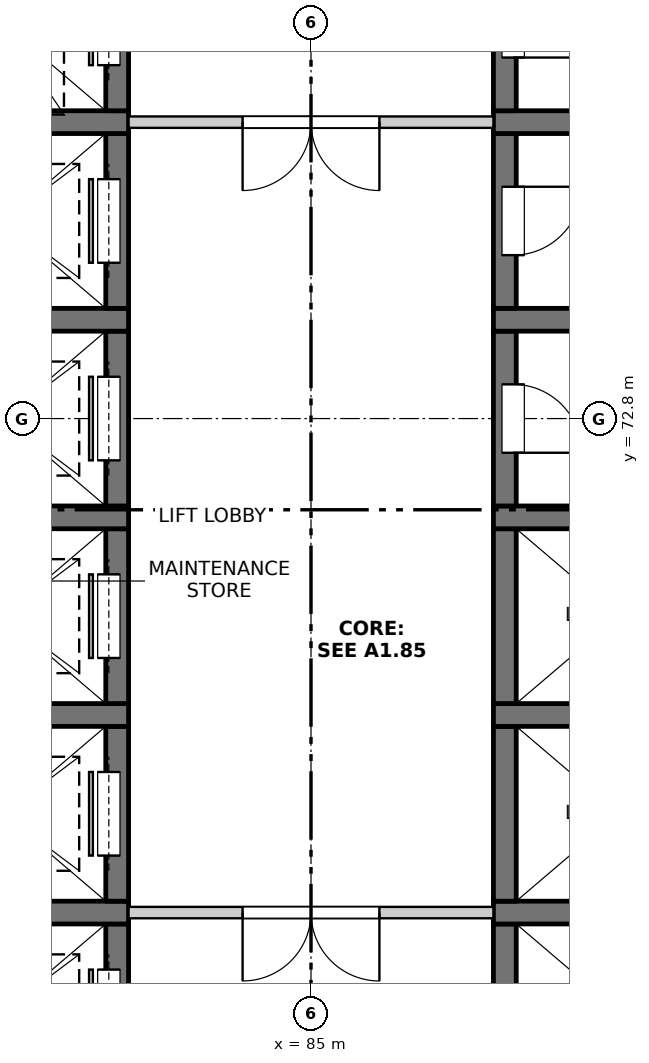
"""IFC4 building model, lengths in metres.
Left out: names, types, materials, properties, quantities, classifications, styles, units other than length and angle.
Written with IfcOpenShell. Run it as: python <this file> out.ifc"""

import sys

from ifc_helpers import new_model, si_unit, direction, frame, frame_2d, origin, place, context, subcontext, project, spatial, rectangle, extrude, element, fill, save


model = new_model("IFC4")
c1 = context("Model", 3, precision=1e-05, world=origin(), true_north=direction((0.0, 1.0)))
c2 = subcontext(c1, "Body", "Model", "MODEL_VIEW")
j1 = project(units=[si_unit("LENGTHUNIT", "METRE"), si_unit("PLANEANGLEUNIT", "RADIAN")], contexts=[c1])
p1 = place(None, origin())
s1 = spatial("IfcSite", under=j1, at=p1, CompositionType="ELEMENT")
p2 = place(p1, origin())
s2 = spatial("IfcBuilding", under=s1, at=p2, CompositionType="ELEMENT")
p3 = place(p2, frame((0.0, 0.0, 110.1)))
s3 = spatial("IfcBuildingStorey", under=s2, at=p3, CompositionType="ELEMENT", Elevation=110.1)
p4 = place(p3, frame((82.45, 63.85, -0.25), z_axis=(0.0, 0.0, 1.0), x_axis=(0.0, 1.0, 0.0)))
e1 = element("IfcWall", 1, at=p4, inside=s3, PredefinedType="SOLIDWALL", context=c2, shape_type="SweptSolid", body=[
    extrude(rectangle(XDim=2.3, YDim=0.3, at=frame_2d((1.15, 0.0))), origin(), (0.0, 0.0, 1.0), 3.4),
])
p5 = place(p4, frame((0.6, 0.0, 0.25)))
e2 = element("IfcOpeningElement", 2, at=p5, cuts=e1, PredefinedType="OPENING", context=c2, shape_type="SweptSolid", body=[
    extrude(rectangle(XDim=1.1, YDim=2.1, at=frame_2d((0.55, 1.05))), frame((0.0, 0.16, 0.0), z_axis=(0.0, -1.0, 0.0), x_axis=(1.0, 0.0, 0.0)), (0.0, 0.0, 1.0), 0.32),
])
p6 = place(p3, frame((79.6, 66.3, -0.25), z_axis=(0.0, 0.0, 1.0), x_axis=(1.0, 0.0, 0.0)))
e3 = element("IfcWall", 3, at=p6, inside=s3, PredefinedType="SOLIDWALL", context=c2, shape_type="SweptSolid", body=[
    extrude(rectangle(XDim=3.0, YDim=0.3, at=frame_2d((1.5, 0.0))), origin(), (0.0, 0.0, 1.0), 3.4),
])
p7 = place(p3, frame((82.45, 66.45, -0.25), z_axis=(0.0, 0.0, 1.0), x_axis=(0.0, 1.0, 0.0)))
e4 = element("IfcWall", 4, at=p7, inside=s3, PredefinedType="SOLIDWALL", context=c2, shape_type="SweptSolid", body=[
    extrude(rectangle(XDim=2.3, YDim=0.3, at=frame_2d((1.15, 0.0))), origin(), (0.0, 0.0, 1.0), 3.4),
])
p8 = place(p7, frame((0.6, 0.0, 0.25)))
e5 = element("IfcOpeningElement", 5, at=p8, cuts=e4, PredefinedType="OPENING", context=c2, shape_type="SweptSolid", body=[
    extrude(rectangle(XDim=1.1, YDim=2.1, at=frame_2d((0.55, 1.05))), frame((0.0, 0.16, 0.0), z_axis=(0.0, -1.0, 0.0), x_axis=(1.0, 0.0, 0.0)), (0.0, 0.0, 1.0), 0.32),
])
p9 = place(p3, frame((79.6, 68.9, -0.25), z_axis=(0.0, 0.0, 1.0), x_axis=(1.0, 0.0, 0.0)))
e6 = element("IfcWall", 6, at=p9, inside=s3, PredefinedType="SOLIDWALL", context=c2, shape_type="SweptSolid", body=[
    extrude(rectangle(XDim=3.0, YDim=0.3, at=frame_2d((1.5, 0.0))), origin(), (0.0, 0.0, 1.0), 3.4),
])
p10 = place(p3, frame((82.45, 69.05, -0.25), z_axis=(0.0, 0.0, 1.0), x_axis=(0.0, 1.0, 0.0)))
e7 = element("IfcWall", 7, at=p10, inside=s3, PredefinedType="SOLIDWALL", context=c2, shape_type="SweptSolid", body=[
    extrude(rectangle(XDim=2.3, YDim=0.3, at=frame_2d((1.15, 0.0))), origin(), (0.0, 0.0, 1.0), 3.4),
])
p11 = place(p10, frame((0.6, 0.0, 0.25)))
e8 = element("IfcOpeningElement", 8, at=p11, cuts=e7, PredefinedType="OPENING", context=c2, shape_type="SweptSolid", body=[
    extrude(rectangle(XDim=1.1, YDim=2.1, at=frame_2d((0.55, 1.05))), frame((0.0, 0.16, 0.0), z_axis=(0.0, -1.0, 0.0), x_axis=(1.0, 0.0, 0.0)), (0.0, 0.0, 1.0), 0.32),
])
p12 = place(p3, frame((79.6, 71.5, -0.25), z_axis=(0.0, 0.0, 1.0), x_axis=(1.0, 0.0, 0.0)))
e9 = element("IfcWall", 9, at=p12, inside=s3, PredefinedType="SOLIDWALL", context=c2, shape_type="SweptSolid", body=[
    extrude(rectangle(XDim=3.0, YDim=0.3, at=frame_2d((1.5, 0.0))), origin(), (0.0, 0.0, 1.0), 3.4),
])
p13 = place(p3, frame((82.45, 71.65, -0.25), z_axis=(0.0, 0.0, 1.0), x_axis=(0.0, 1.0, 0.0)))
e10 = element("IfcWall", 10, at=p13, inside=s3, PredefinedType="SOLIDWALL", context=c2, shape_type="SweptSolid", body=[
    extrude(rectangle(XDim=2.3, YDim=0.3, at=frame_2d((1.15, 0.0))), origin(), (0.0, 0.0, 1.0), 3.4),
])
p14 = place(p13, frame((0.6, 0.0, 0.25)))
e11 = element("IfcOpeningElement", 11, at=p14, cuts=e10, PredefinedType="OPENING", context=c2, shape_type="SweptSolid", body=[
    extrude(rectangle(XDim=1.1, YDim=2.1, at=frame_2d((0.55, 1.05))), frame((0.0, 0.16, 0.0), z_axis=(0.0, -1.0, 0.0), x_axis=(1.0, 0.0, 0.0)), (0.0, 0.0, 1.0), 0.32),
])
p15 = place(p3, frame((79.6, 74.1, -0.25), z_axis=(0.0, 0.0, 1.0), x_axis=(1.0, 0.0, 0.0)))
e12 = element("IfcWall", 12, at=p15, inside=s3, PredefinedType="SOLIDWALL", context=c2, shape_type="SweptSolid", body=[
    extrude(rectangle(XDim=3.0, YDim=0.3, at=frame_2d((1.5, 0.0))), origin(), (0.0, 0.0, 1.0), 3.4),
])
p16 = place(p3, frame((82.45, 74.25, -0.25), z_axis=(0.0, 0.0, 1.0), x_axis=(0.0, 1.0, 0.0)))
e13 = element("IfcWall", 13, at=p16, inside=s3, PredefinedType="SOLIDWALL", context=c2, shape_type="SweptSolid", body=[
    extrude(rectangle(XDim=2.3, YDim=0.3, at=frame_2d((1.15, 0.0))), origin(), (0.0, 0.0, 1.0), 3.4),
])
p17 = place(p16, frame((0.6, 0.0, 0.25)))
e14 = element("IfcOpeningElement", 14, at=p17, cuts=e13, PredefinedType="OPENING", context=c2, shape_type="SweptSolid", body=[
    extrude(rectangle(XDim=1.1, YDim=2.1, at=frame_2d((0.55, 1.05))), frame((0.0, 0.16, 0.0), z_axis=(0.0, -1.0, 0.0), x_axis=(1.0, 0.0, 0.0)), (0.0, 0.0, 1.0), 0.32),
])
p18 = place(p3, frame((79.6, 76.7, -0.25), z_axis=(0.0, 0.0, 1.0), x_axis=(1.0, 0.0, 0.0)))
e15 = element("IfcWall", 15, at=p18, inside=s3, PredefinedType="SOLIDWALL", context=c2, shape_type="SweptSolid", body=[
    extrude(rectangle(XDim=3.0, YDim=0.3, at=frame_2d((1.5, 0.0))), origin(), (0.0, 0.0, 1.0), 3.4),
])
p19 = place(p3, frame((82.45, 76.85, -0.25), z_axis=(0.0, 0.0, 1.0), x_axis=(0.0, 1.0, 0.0)))
e16 = element("IfcWall", 16, at=p19, inside=s3, PredefinedType="SOLIDWALL", context=c2, shape_type="SweptSolid", body=[
    extrude(rectangle(XDim=2.3, YDim=0.3, at=frame_2d((1.15, 0.0))), origin(), (0.0, 0.0, 1.0), 3.4),
])
p20 = place(p19, frame((0.6, 0.0, 0.25)))
e17 = element("IfcOpeningElement", 17, at=p20, cuts=e16, PredefinedType="OPENING", context=c2, shape_type="SweptSolid", body=[
    extrude(rectangle(XDim=1.1, YDim=2.1, at=frame_2d((0.55, 1.05))), frame((0.0, 0.16, 0.0), z_axis=(0.0, -1.0, 0.0), x_axis=(1.0, 0.0, 0.0)), (0.0, 0.0, 1.0), 0.32),
])
p21 = place(p3, frame((87.55, 63.85, -0.25), z_axis=(0.0, 0.0, 1.0), x_axis=(0.0, 1.0, 0.0)))
e18 = element("IfcWall", 18, at=p21, inside=s3, PredefinedType="SOLIDWALL", context=c2, shape_type="SweptSolid", body=[
    extrude(rectangle(XDim=2.3, YDim=0.3, at=frame_2d((1.15, 0.0))), origin(), (0.0, 0.0, 1.0), 3.4),
])
p22 = place(p3, frame((87.4, 66.3, -0.25), z_axis=(0.0, 0.0, 1.0), x_axis=(1.0, 0.0, 0.0)))
e19 = element("IfcWall", 19, at=p22, inside=s3, PredefinedType="SOLIDWALL", context=c2, shape_type="SweptSolid", body=[
    extrude(rectangle(XDim=3.0, YDim=0.3, at=frame_2d((1.5, 0.0))), origin(), (0.0, 0.0, 1.0), 3.4),
])
p23 = place(p3, frame((87.55, 66.45, -0.25), z_axis=(0.0, 0.0, 1.0), x_axis=(0.0, 1.0, 0.0)))
e20 = element("IfcWall", 20, at=p23, inside=s3, PredefinedType="SOLIDWALL", context=c2, shape_type="SweptSolid", body=[
    extrude(rectangle(XDim=2.3, YDim=0.3, at=frame_2d((1.15, 0.0))), origin(), (0.0, 0.0, 1.0), 3.4),
])
p24 = place(p3, frame((87.4, 68.9, -0.25), z_axis=(0.0, 0.0, 1.0), x_axis=(1.0, 0.0, 0.0)))
e21 = element("IfcWall", 21, at=p24, inside=s3, PredefinedType="SOLIDWALL", context=c2, shape_type="SweptSolid", body=[
    extrude(rectangle(XDim=3.0, YDim=0.3, at=frame_2d((1.5, 0.0))), origin(), (0.0, 0.0, 1.0), 3.4),
])
p25 = place(p3, frame((87.55, 69.05, -0.25), z_axis=(0.0, 0.0, 1.0), x_axis=(0.0, 1.0, 0.0)))
e22 = element("IfcWall", 22, at=p25, inside=s3, PredefinedType="SOLIDWALL", context=c2, shape_type="SweptSolid", body=[
    extrude(rectangle(XDim=2.3, YDim=0.3, at=frame_2d((1.15, 0.0))), origin(), (0.0, 0.0, 1.0), 3.4),
])
p26 = place(p3, frame((87.4, 71.5, -0.25), z_axis=(0.0, 0.0, 1.0), x_axis=(1.0, 0.0, 0.0)))
e23 = element("IfcWall", 23, at=p26, inside=s3, PredefinedType="SOLIDWALL", context=c2, shape_type="SweptSolid", body=[
    extrude(rectangle(XDim=3.0, YDim=0.3, at=frame_2d((1.5, 0.0))), origin(), (0.0, 0.0, 1.0), 3.4),
])
p27 = place(p3, frame((87.55, 71.65, -0.25), z_axis=(0.0, 0.0, 1.0), x_axis=(0.0, 1.0, 0.0)))
e24 = element("IfcWall", 24, at=p27, inside=s3, PredefinedType="SOLIDWALL", context=c2, shape_type="SweptSolid", body=[
    extrude(rectangle(XDim=2.3, YDim=0.3, at=frame_2d((1.15, 0.0))), origin(), (0.0, 0.0, 1.0), 3.4),
])
p28 = place(p27, frame((0.7, 0.0, 0.25)))
e25 = element("IfcOpeningElement", 25, at=p28, cuts=e24, PredefinedType="OPENING", context=c2, shape_type="SweptSolid", body=[
    extrude(rectangle(XDim=0.9, YDim=2.1, at=frame_2d((0.45, 1.05))), frame((0.0, 0.16, 0.0), z_axis=(0.0, -1.0, 0.0), x_axis=(1.0, 0.0, 0.0)), (0.0, 0.0, 1.0), 0.32),
])
p29 = place(p3, frame((87.4, 74.1, -0.25), z_axis=(0.0, 0.0, 1.0), x_axis=(1.0, 0.0, 0.0)))
e26 = element("IfcWall", 26, at=p29, inside=s3, PredefinedType="SOLIDWALL", context=c2, shape_type="SweptSolid", body=[
    extrude(rectangle(XDim=3.0, YDim=0.3, at=frame_2d((1.5, 0.0))), origin(), (0.0, 0.0, 1.0), 3.4),
])
p30 = place(p3, frame((87.55, 74.25, -0.25), z_axis=(0.0, 0.0, 1.0), x_axis=(0.0, 1.0, 0.0)))
e27 = element("IfcWall", 27, at=p30, inside=s3, PredefinedType="SOLIDWALL", context=c2, shape_type="SweptSolid", body=[
    extrude(rectangle(XDim=2.3, YDim=0.3, at=frame_2d((1.15, 0.0))), origin(), (0.0, 0.0, 1.0), 3.4),
])
p31 = place(p30, frame((0.7, 0.0, 0.25)))
e28 = element("IfcOpeningElement", 28, at=p31, cuts=e27, PredefinedType="OPENING", context=c2, shape_type="SweptSolid", body=[
    extrude(rectangle(XDim=0.9, YDim=2.1, at=frame_2d((0.45, 1.05))), frame((0.0, 0.16, 0.0), z_axis=(0.0, -1.0, 0.0), x_axis=(1.0, 0.0, 0.0)), (0.0, 0.0, 1.0), 0.32),
])
p32 = place(p3, frame((87.4, 76.7, -0.25), z_axis=(0.0, 0.0, 1.0), x_axis=(1.0, 0.0, 0.0)))
e29 = element("IfcWall", 29, at=p32, inside=s3, PredefinedType="SOLIDWALL", context=c2, shape_type="SweptSolid", body=[
    extrude(rectangle(XDim=3.0, YDim=0.3, at=frame_2d((1.5, 0.0))), origin(), (0.0, 0.0, 1.0), 3.4),
])
p33 = place(p3, frame((87.55, 76.85, -0.25), z_axis=(0.0, 0.0, 1.0), x_axis=(0.0, 1.0, 0.0)))
e30 = element("IfcWall", 30, at=p33, inside=s3, PredefinedType="SOLIDWALL", context=c2, shape_type="SweptSolid", body=[
    extrude(rectangle(XDim=2.3, YDim=0.3, at=frame_2d((1.15, 0.0))), origin(), (0.0, 0.0, 1.0), 3.4),
])
p34 = place(p33, frame((0.7, 0.0, 0.25)))
e31 = element("IfcOpeningElement", 31, at=p34, cuts=e30, PredefinedType="OPENING", context=c2, shape_type="SweptSolid", body=[
    extrude(rectangle(XDim=0.9, YDim=2.1, at=frame_2d((0.45, 1.05))), frame((0.0, 0.16, 0.0), z_axis=(0.0, -1.0, 0.0), x_axis=(1.0, 0.0, 0.0)), (0.0, 0.0, 1.0), 0.32),
])
p35 = place(p3, frame((82.6, 66.3, 0.0), z_axis=(0.0, 0.0, 1.0), x_axis=(1.0, 0.0, 0.0)))
e32 = element("IfcWall", 32, at=p35, inside=s3, PredefinedType="PARTITIONING", context=c2, shape_type="SweptSolid", body=[
    extrude(rectangle(XDim=4.8, YDim=0.15, at=frame_2d((2.4, 0.0))), origin(), (0.0, 0.0, 1.0), 3.15),
])
p36 = place(p35, frame((1.5, 0.0, 0.0)))
e33 = element("IfcOpeningElement", 33, at=p36, cuts=e32, PredefinedType="OPENING", context=c2, shape_type="SweptSolid", body=[
    extrude(rectangle(XDim=1.8, YDim=2.1, at=frame_2d((0.9, 1.05))), frame((0.0, 0.085, 0.0), z_axis=(0.0, -1.0, 0.0), x_axis=(1.0, 0.0, 0.0)), (0.0, 0.0, 1.0), 0.17),
])
p37 = place(p3, frame((82.6, 76.7, 0.0), z_axis=(0.0, 0.0, 1.0), x_axis=(1.0, 0.0, 0.0)))
e34 = element("IfcWall", 34, at=p37, inside=s3, PredefinedType="PARTITIONING", context=c2, shape_type="SweptSolid", body=[
    extrude(rectangle(XDim=4.8, YDim=0.15, at=frame_2d((2.4, 0.0))), origin(), (0.0, 0.0, 1.0), 3.15),
])
p38 = place(p37, frame((1.5, 0.0, 0.0)))
e35 = element("IfcOpeningElement", 35, at=p38, cuts=e34, PredefinedType="OPENING", context=c2, shape_type="SweptSolid", body=[
    extrude(rectangle(XDim=1.8, YDim=2.1, at=frame_2d((0.9, 1.05))), frame((0.0, 0.085, 0.0), z_axis=(0.0, -1.0, 0.0), x_axis=(1.0, 0.0, 0.0)), (0.0, 0.0, 1.0), 0.17),
])
p39 = place(p5, origin())
e36 = element("IfcDoor", 36, at=p39, inside=s3, OperationType="SLIDING_TO_RIGHT", PredefinedType="DOOR", context=c2, shape_type="SweptSolid", body=[
    extrude(rectangle(XDim=1.1, YDim=2.1, at=frame_2d((0.55, 1.05))), frame((0.0, 0.135, 0.0), z_axis=(0.0, -1.0, 0.0), x_axis=(1.0, 0.0, 0.0)), (0.0, 0.0, 1.0), 0.05),
])
fill(e2, e36)
p40 = place(p36, origin())
e37 = element("IfcDoor", 37, at=p40, inside=s3, OperationType="DOUBLE_DOOR_SINGLE_SWING", PredefinedType="DOOR", context=c2, shape_type="SweptSolid", body=[
    extrude(rectangle(XDim=1.8, YDim=2.1, at=frame_2d((0.9, 1.05))), frame((0.0, 0.025, 0.0), z_axis=(0.0, -1.0, 0.0), x_axis=(1.0, 0.0, 0.0)), (0.0, 0.0, 1.0), 0.05),
])
fill(e33, e37)
p41 = place(p8, origin())
e38 = element("IfcDoor", 38, at=p41, inside=s3, OperationType="SLIDING_TO_RIGHT", PredefinedType="DOOR", context=c2, shape_type="SweptSolid", body=[
    extrude(rectangle(XDim=1.1, YDim=2.1, at=frame_2d((0.55, 1.05))), frame((0.0, 0.135, 0.0), z_axis=(0.0, -1.0, 0.0), x_axis=(1.0, 0.0, 0.0)), (0.0, 0.0, 1.0), 0.05),
])
fill(e5, e38)
p42 = place(p11, origin())
e39 = element("IfcDoor", 39, at=p42, inside=s3, OperationType="SLIDING_TO_LEFT", PredefinedType="DOOR", context=c2, shape_type="SweptSolid", body=[
    extrude(rectangle(XDim=1.1, YDim=2.1, at=frame_2d((0.55, 1.05))), frame((0.0, 0.135, 0.0), z_axis=(0.0, -1.0, 0.0), x_axis=(1.0, 0.0, 0.0)), (0.0, 0.0, 1.0), 0.05),
])
fill(e8, e39)
p43 = place(p14, origin())
e40 = element("IfcDoor", 40, at=p43, inside=s3, OperationType="SLIDING_TO_LEFT", PredefinedType="DOOR", context=c2, shape_type="SweptSolid", body=[
    extrude(rectangle(XDim=1.1, YDim=2.1, at=frame_2d((0.55, 1.05))), frame((0.0, 0.135, 0.0), z_axis=(0.0, -1.0, 0.0), x_axis=(1.0, 0.0, 0.0)), (0.0, 0.0, 1.0), 0.05),
])
fill(e11, e40)
p44 = place(p28, origin())
e41 = element("IfcDoor", 41, at=p44, inside=s3, OperationType="SINGLE_SWING_RIGHT", PredefinedType="DOOR", context=c2, shape_type="SweptSolid", body=[
    extrude(rectangle(XDim=0.9, YDim=2.1, at=frame_2d((0.45, 1.05))), frame((0.0, -0.085, 0.0), z_axis=(0.0, -1.0, 0.0), x_axis=(1.0, 0.0, 0.0)), (0.0, 0.0, 1.0), 0.05),
])
fill(e25, e41)
p45 = place(p17, origin())
e42 = element("IfcDoor", 42, at=p45, inside=s3, OperationType="SLIDING_TO_LEFT", PredefinedType="DOOR", context=c2, shape_type="SweptSolid", body=[
    extrude(rectangle(XDim=1.1, YDim=2.1, at=frame_2d((0.55, 1.05))), frame((0.0, 0.135, 0.0), z_axis=(0.0, -1.0, 0.0), x_axis=(1.0, 0.0, 0.0)), (0.0, 0.0, 1.0), 0.05),
])
fill(e14, e42)
p46 = place(p31, origin())
e43 = element("IfcDoor", 43, at=p46, inside=s3, OperationType="SINGLE_SWING_LEFT", PredefinedType="DOOR", context=c2, shape_type="SweptSolid", body=[
    extrude(rectangle(XDim=0.9, YDim=2.1, at=frame_2d((0.45, 1.05))), frame((0.0, -0.085, 0.0), z_axis=(0.0, -1.0, 0.0), x_axis=(1.0, 0.0, 0.0)), (0.0, 0.0, 1.0), 0.05),
])
fill(e28, e43)
p47 = place(p38, origin())
e44 = element("IfcDoor", 44, at=p47, inside=s3, OperationType="DOUBLE_DOOR_SINGLE_SWING", PredefinedType="DOOR", context=c2, shape_type="SweptSolid", body=[
    extrude(rectangle(XDim=1.8, YDim=2.1, at=frame_2d((0.9, 1.05))), frame((0.0, 0.025, 0.0), z_axis=(0.0, -1.0, 0.0), x_axis=(1.0, 0.0, 0.0)), (0.0, 0.0, 1.0), 0.05),
])
fill(e35, e44)
p48 = place(p20, origin())
e45 = element("IfcDoor", 45, at=p48, inside=s3, OperationType="SLIDING_TO_LEFT", PredefinedType="DOOR", context=c2, shape_type="SweptSolid", body=[
    extrude(rectangle(XDim=1.1, YDim=2.1, at=frame_2d((0.55, 1.05))), frame((0.0, 0.135, 0.0), z_axis=(0.0, -1.0, 0.0), x_axis=(1.0, 0.0, 0.0)), (0.0, 0.0, 1.0), 0.05),
])
fill(e17, e45)
p49 = place(p34, origin())
e46 = element("IfcDoor", 46, at=p49, inside=s3, OperationType="SINGLE_SWING_RIGHT", PredefinedType="DOOR", context=c2, shape_type="SweptSolid", body=[
    extrude(rectangle(XDim=0.9, YDim=2.1, at=frame_2d((0.45, 1.05))), frame((0.0, -0.085, 0.0), z_axis=(0.0, -1.0, 0.0), x_axis=(1.0, 0.0, 0.0)), (0.0, 0.0, 1.0), 0.05),
])
fill(e31, e46)
save(model, sys.argv[1])
